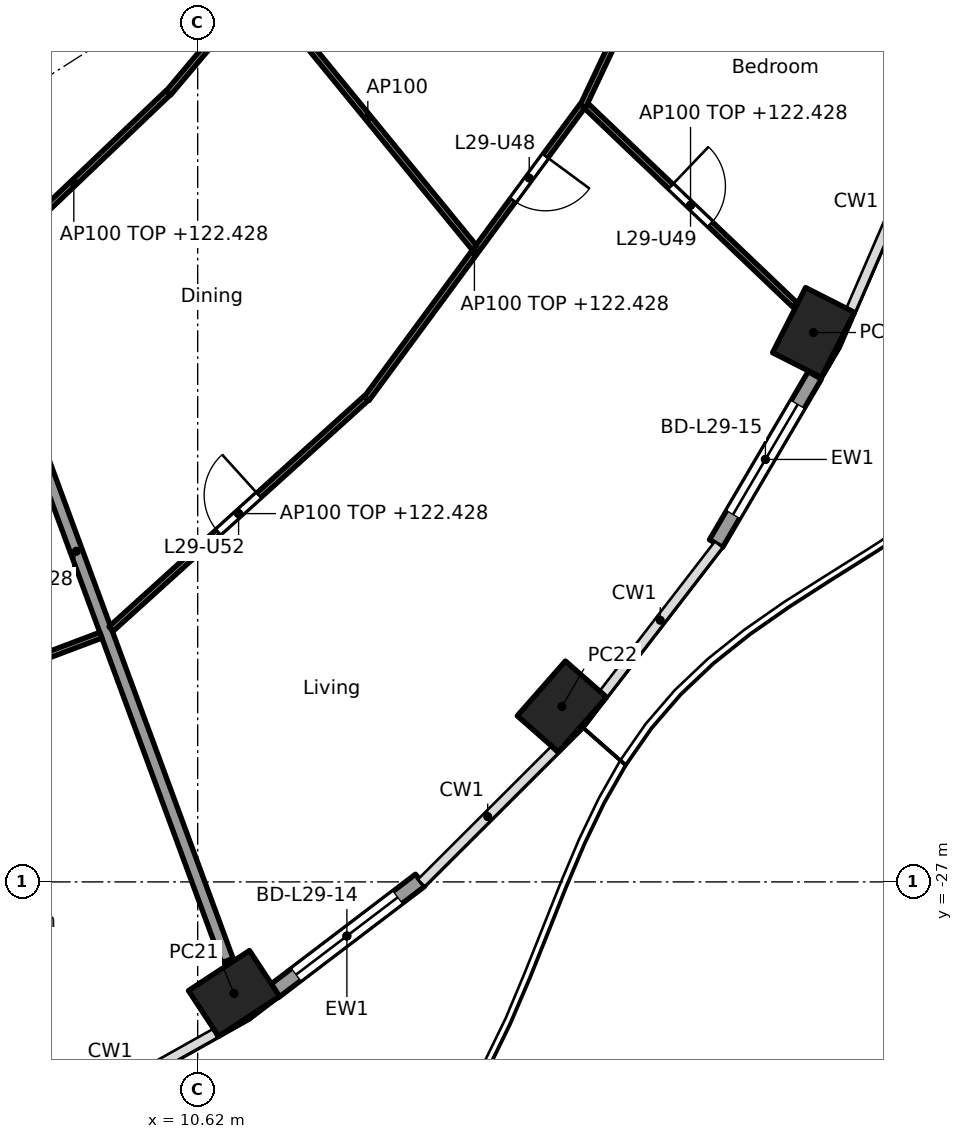
"""IFC4 building model, lengths in metres.
Left out: names, types, materials, properties, quantities, classifications, styles, units other than length and angle.
Written with IfcOpenShell. Run it as: python <this file> out.ifc"""

import sys

from ifc_helpers import new_model, si_unit, direction, frame, frame_2d, origin, origin_2d, place, context, subcontext, project, spatial, rectangle, hollow_rectangle, extrude, element, fill, save


model = new_model("IFC4")
c1 = context("Model", 3, precision=1e-05, world=origin(), true_north=direction((0.0, 1.0)))
c2 = subcontext(c1, "Body", "Model", "MODEL_VIEW")
j1 = project(units=[si_unit("LENGTHUNIT", "METRE"), si_unit("PLANEANGLEUNIT", "RADIAN")], contexts=[c1])
p1 = place(None, origin())
s1 = spatial("IfcSite", under=j1, at=p1, CompositionType="ELEMENT")
p2 = place(p1, origin())
s2 = spatial("IfcBuilding", under=s1, at=p2, CompositionType="ELEMENT")
p3 = place(p2, frame((0.0, 0.0, 119.6)))
s3 = spatial("IfcBuildingStorey", under=s2, at=p3, CompositionType="ELEMENT", Elevation=119.6)
for number, where, z_axis, x_axis in (
    (1, (11.218, -28.834, -0.26), (0.0, 0.0, 1.0), (0.836, 0.549, 0.0)),
    (2, (16.61, -24.115, -0.26), (0.0, 0.0, 1.0), (0.66, 0.751, 0.0)),
    (3, (20.747, -17.965, -0.26), (0.0, 0.0, 1.0), (0.452, 0.892, 0.0)),
):
    element("IfcColumn", number, at=place(p3, frame(where, z_axis=z_axis, x_axis=x_axis)), inside=s3, PredefinedType="COLUMN", context=c2, shape_type="SweptSolid", body=[
        extrude(hollow_rectangle(XDim=1.2, YDim=0.9, WallThickness=0.04, at=origin_2d()), origin(), (0.0, 0.0, 1.0), 3.96),
    ])
p4 = place(p3, frame((14.278, -26.973, 0.0), z_axis=(0.0, 0.0, 1.0), x_axis=(-0.796022231079, -0.605267385233, 0.0)))
e4 = element("IfcWall", 4, at=p4, inside=s3, PredefinedType="SOLIDWALL", context=c2, shape_type="SweptSolid", body=[
    extrude(rectangle(XDim=3.026, YDim=0.25, at=frame_2d((1.513, 0.0))), origin(), (0.0, 0.0, 1.0), 3.44),
])
p5 = place(p4, frame((0.463, 0.0, 0.0)))
e5 = element("IfcOpeningElement", 5, at=p5, cuts=e4, PredefinedType="OPENING", context=c2, shape_type="SweptSolid", body=[
    extrude(rectangle(XDim=2.1, YDim=2.4, at=frame_2d((1.05, 1.2))), frame((0.0, 0.135, 0.0), z_axis=(0.0, -1.0, 0.0), x_axis=(1.0, 0.0, 0.0)), (0.0, 0.0, 1.0), 0.27),
])
p6 = place(p3, frame((20.768, -18.669, 0.0), z_axis=(0.0, 0.0, 1.0), x_axis=(-0.506314982873, -0.862348617508, 0.0)))
e6 = element("IfcWall", 6, at=p6, inside=s3, PredefinedType="SOLIDWALL", context=c2, shape_type="SweptSolid", body=[
    extrude(rectangle(XDim=3.208, YDim=0.25, at=frame_2d((1.604, 0.0))), origin(), (0.0, 0.0, 1.0), 3.44),
])
p7 = place(p6, frame((0.554, 0.0, 0.0)))
e7 = element("IfcOpeningElement", 7, at=p7, cuts=e6, PredefinedType="OPENING", context=c2, shape_type="SweptSolid", body=[
    extrude(rectangle(XDim=2.1, YDim=2.4, at=frame_2d((1.05, 1.2))), frame((0.0, 0.135, 0.0), z_axis=(0.0, -1.0, 0.0), x_axis=(1.0, 0.0, 0.0)), (0.0, 0.0, 1.0), 0.27),
])
p8 = place(p3, frame((6.14, -14.829, 0.0), z_axis=(0.0, 0.0, 1.0), x_axis=(0.346169582481, -0.938171956608, 0.0)))
e8 = element("IfcWall", 8, at=p8, inside=s3, PredefinedType="PARTITIONING", context=c2, shape_type="SweptSolid", body=[
    extrude(rectangle(XDim=14.354, YDim=0.2, at=frame_2d((7.177, 0.0))), origin(), (0.0, 0.0, 1.0), 2.828),
])
p9 = place(p3, frame((4.178, -24.773, 0.0), z_axis=(0.0, 0.0, 1.0), x_axis=(0.935583811437, 0.353104703702, 0.0)))
e9 = element("IfcWall", 9, at=p9, inside=s3, PredefinedType="PARTITIONING", context=c2, shape_type="SweptSolid", body=[
    extrude(rectangle(XDim=5.184, YDim=0.1, at=frame_2d((2.592, 0.0))), origin(), (0.0, 0.0, 1.0), 2.828),
])
p10 = place(p3, frame((7.032, -16.98, 0.0), z_axis=(0.0, 0.0, 1.0), x_axis=(0.723709759148, 0.690104473622, 0.0)))
e10 = element("IfcWall", 10, at=p10, inside=s3, PredefinedType="PARTITIONING", context=c2, shape_type="SweptSolid", body=[
    extrude(rectangle(XDim=4.286, YDim=0.1, at=frame_2d((2.143, 0.0))), origin(), (0.0, 0.0, 1.0), 2.828),
])
p11 = place(p3, frame((9.195, -22.84, 0.0), z_axis=(0.0, 0.0, 1.0), x_axis=(0.741675855479, 0.670758470241, 0.0)))
e11 = element("IfcWall", 11, at=p11, inside=s3, PredefinedType="PARTITIONING", context=c2, shape_type="SweptSolid", body=[
    extrude(rectangle(XDim=5.656, YDim=0.1, at=frame_2d((2.828, 0.0))), origin(), (0.0, 0.0, 1.0), 2.828),
])
p12 = place(p11, frame((2.378, 0.0, 0.0)))
e12 = element("IfcOpeningElement", 12, at=p12, cuts=e11, PredefinedType="OPENING", context=c2, shape_type="SweptSolid", body=[
    extrude(rectangle(XDim=0.9, YDim=2.1, at=frame_2d((0.45, 1.05))), frame((0.0, 0.06, 0.0), z_axis=(0.0, -1.0, 0.0), x_axis=(1.0, 0.0, 0.0)), (0.0, 0.0, 1.0), 0.12),
])
p13 = place(p3, frame((10.138, -14.026, 0.0), z_axis=(0.0, 0.0, 1.0), x_axis=(0.644051444483, 0.764982180746, 0.0)))
e13 = element("IfcWall", 13, at=p13, inside=s3, PredefinedType="PARTITIONING", context=c2, shape_type="SweptSolid", body=[
    extrude(rectangle(XDim=4.548, YDim=0.1, at=frame_2d((2.274, 0.0))), origin(), (0.0, 0.0, 1.0), 2.828),
])
p14 = place(p13, frame((2.986, 0.0, 0.0)))
e14 = element("IfcOpeningElement", 14, at=p14, cuts=e13, PredefinedType="OPENING", context=c2, shape_type="SweptSolid", body=[
    extrude(rectangle(XDim=0.9, YDim=2.1, at=frame_2d((0.45, 1.05))), frame((0.0, 0.06, 0.0), z_axis=(0.0, -1.0, 0.0), x_axis=(1.0, 0.0, 0.0)), (0.0, 0.0, 1.0), 0.12),
])
p15 = place(p3, frame((13.397, -19.053, 0.0), z_axis=(0.0, 0.0, 1.0), x_axis=(0.593522299069, 0.804817544856, 0.0)))
e15 = element("IfcWall", 15, at=p15, inside=s3, PredefinedType="PARTITIONING", context=c2, shape_type="SweptSolid", body=[
    extrude(rectangle(XDim=5.976, YDim=0.1, at=frame_2d((2.988, 0.0))), origin(), (0.0, 0.0, 1.0), 2.828),
])
p16 = place(p15, frame((4.057, 0.0, 0.0)))
e16 = element("IfcOpeningElement", 16, at=p16, cuts=e15, PredefinedType="OPENING", context=c2, shape_type="SweptSolid", body=[
    extrude(rectangle(XDim=0.9, YDim=2.1, at=frame_2d((0.45, 1.05))), frame((0.0, 0.06, 0.0), z_axis=(0.0, -1.0, 0.0), x_axis=(1.0, 0.0, 0.0)), (0.0, 0.0, 1.0), 0.12),
])
p17 = place(p3, frame((11.667, -12.287, 0.0), z_axis=(0.0, 0.0, 1.0), x_axis=(0.633038312428, -0.774120465431, 0.0)))
e17 = element("IfcWall", 17, at=p17, inside=s3, PredefinedType="PARTITIONING", context=c2, shape_type="SweptSolid", body=[
    extrude(rectangle(XDim=5.532, YDim=0.1, at=frame_2d((2.766, 0.0))), origin(), (0.0, 0.0, 1.0), 3.44),
])
p18 = place(p3, frame((17.01, -14.238, 0.0), z_axis=(0.0, 0.0, 1.0), x_axis=(0.723650186498, -0.690166941821, 0.0)))
e18 = element("IfcWall", 18, at=p18, inside=s3, PredefinedType="PARTITIONING", context=c2, shape_type="SweptSolid", body=[
    extrude(rectangle(XDim=4.74, YDim=0.1, at=frame_2d((2.37, 0.0))), origin(), (0.0, 0.0, 1.0), 2.828),
])
p19 = place(p18, frame((1.92, 0.0, 0.0)))
e19 = element("IfcOpeningElement", 19, at=p19, cuts=e18, PredefinedType="OPENING", context=c2, shape_type="SweptSolid", body=[
    extrude(rectangle(XDim=0.9, YDim=2.1, at=frame_2d((0.45, 1.05))), frame((0.0, 0.06, 0.0), z_axis=(0.0, -1.0, 0.0), x_axis=(1.0, 0.0, 0.0)), (0.0, 0.0, 1.0), 0.12),
])
p20 = place(p3, frame((16.953, -14.249, 0.0), z_axis=(0.0, 0.0, 1.0), x_axis=(0.427456178439, 0.904036069808, 0.0)))
e20 = element("IfcWall", 20, at=p20, inside=s3, PredefinedType="PARTITIONING", context=c2, shape_type="SweptSolid", body=[
    extrude(rectangle(XDim=6.113, YDim=0.1, at=frame_2d((3.057, 0.0))), origin(), (0.0, 0.0, 1.0), 2.828),
])
p21 = place(p5, origin())
e21 = element("IfcDoor", 21, at=p21, inside=s3, OperationType="SLIDING_TO_LEFT", PredefinedType="DOOR", context=c2, shape_type="SweptSolid", body=[
    extrude(rectangle(XDim=2.1, YDim=2.4, at=frame_2d((1.05, 1.2))), frame((0.0, 0.025, 0.0), z_axis=(0.0, -1.0, 0.0), x_axis=(1.0, 0.0, 0.0)), (0.0, 0.0, 1.0), 0.05),
])
fill(e5, e21)
p22 = place(p7, origin())
e22 = element("IfcDoor", 22, at=p22, inside=s3, OperationType="SLIDING_TO_LEFT", PredefinedType="DOOR", context=c2, shape_type="SweptSolid", body=[
    extrude(rectangle(XDim=2.1, YDim=2.4, at=frame_2d((1.05, 1.2))), frame((0.0, 0.025, 0.0), z_axis=(0.0, -1.0, 0.0), x_axis=(1.0, 0.0, 0.0)), (0.0, 0.0, 1.0), 0.05),
])
fill(e7, e22)
p23 = place(p16, frame((0.9, 0.0, 0.0), x_axis=(-1.0, 0.0, 0.0)))
e23 = element("IfcDoor", 23, at=p23, inside=s3, OperationType="SINGLE_SWING_LEFT", PredefinedType="DOOR", context=c2, shape_type="SweptSolid", body=[
    extrude(rectangle(XDim=0.9, YDim=2.1, at=frame_2d((0.45, 1.05))), frame((0.0, 0.025, 0.0), z_axis=(0.0, -1.0, 0.0), x_axis=(1.0, 0.0, 0.0)), (0.0, 0.0, 1.0), 0.05),
])
fill(e16, e23)
p24 = place(p19, origin())
e24 = element("IfcDoor", 24, at=p24, inside=s3, OperationType="SINGLE_SWING_LEFT", PredefinedType="DOOR", context=c2, shape_type="SweptSolid", body=[
    extrude(rectangle(XDim=0.9, YDim=2.1, at=frame_2d((0.45, 1.05))), frame((0.0, 0.025, 0.0), z_axis=(0.0, -1.0, 0.0), x_axis=(1.0, 0.0, 0.0)), (0.0, 0.0, 1.0), 0.05),
])
fill(e19, e24)
p25 = place(p12, origin())
e25 = element("IfcDoor", 25, at=p25, inside=s3, OperationType="SINGLE_SWING_RIGHT", PredefinedType="DOOR", context=c2, shape_type="SweptSolid", body=[
    extrude(rectangle(XDim=0.9, YDim=2.1, at=frame_2d((0.45, 1.05))), frame((0.0, 0.025, 0.0), z_axis=(0.0, -1.0, 0.0), x_axis=(1.0, 0.0, 0.0)), (0.0, 0.0, 1.0), 0.05),
])
fill(e12, e25)
save(model, sys.argv[1])
